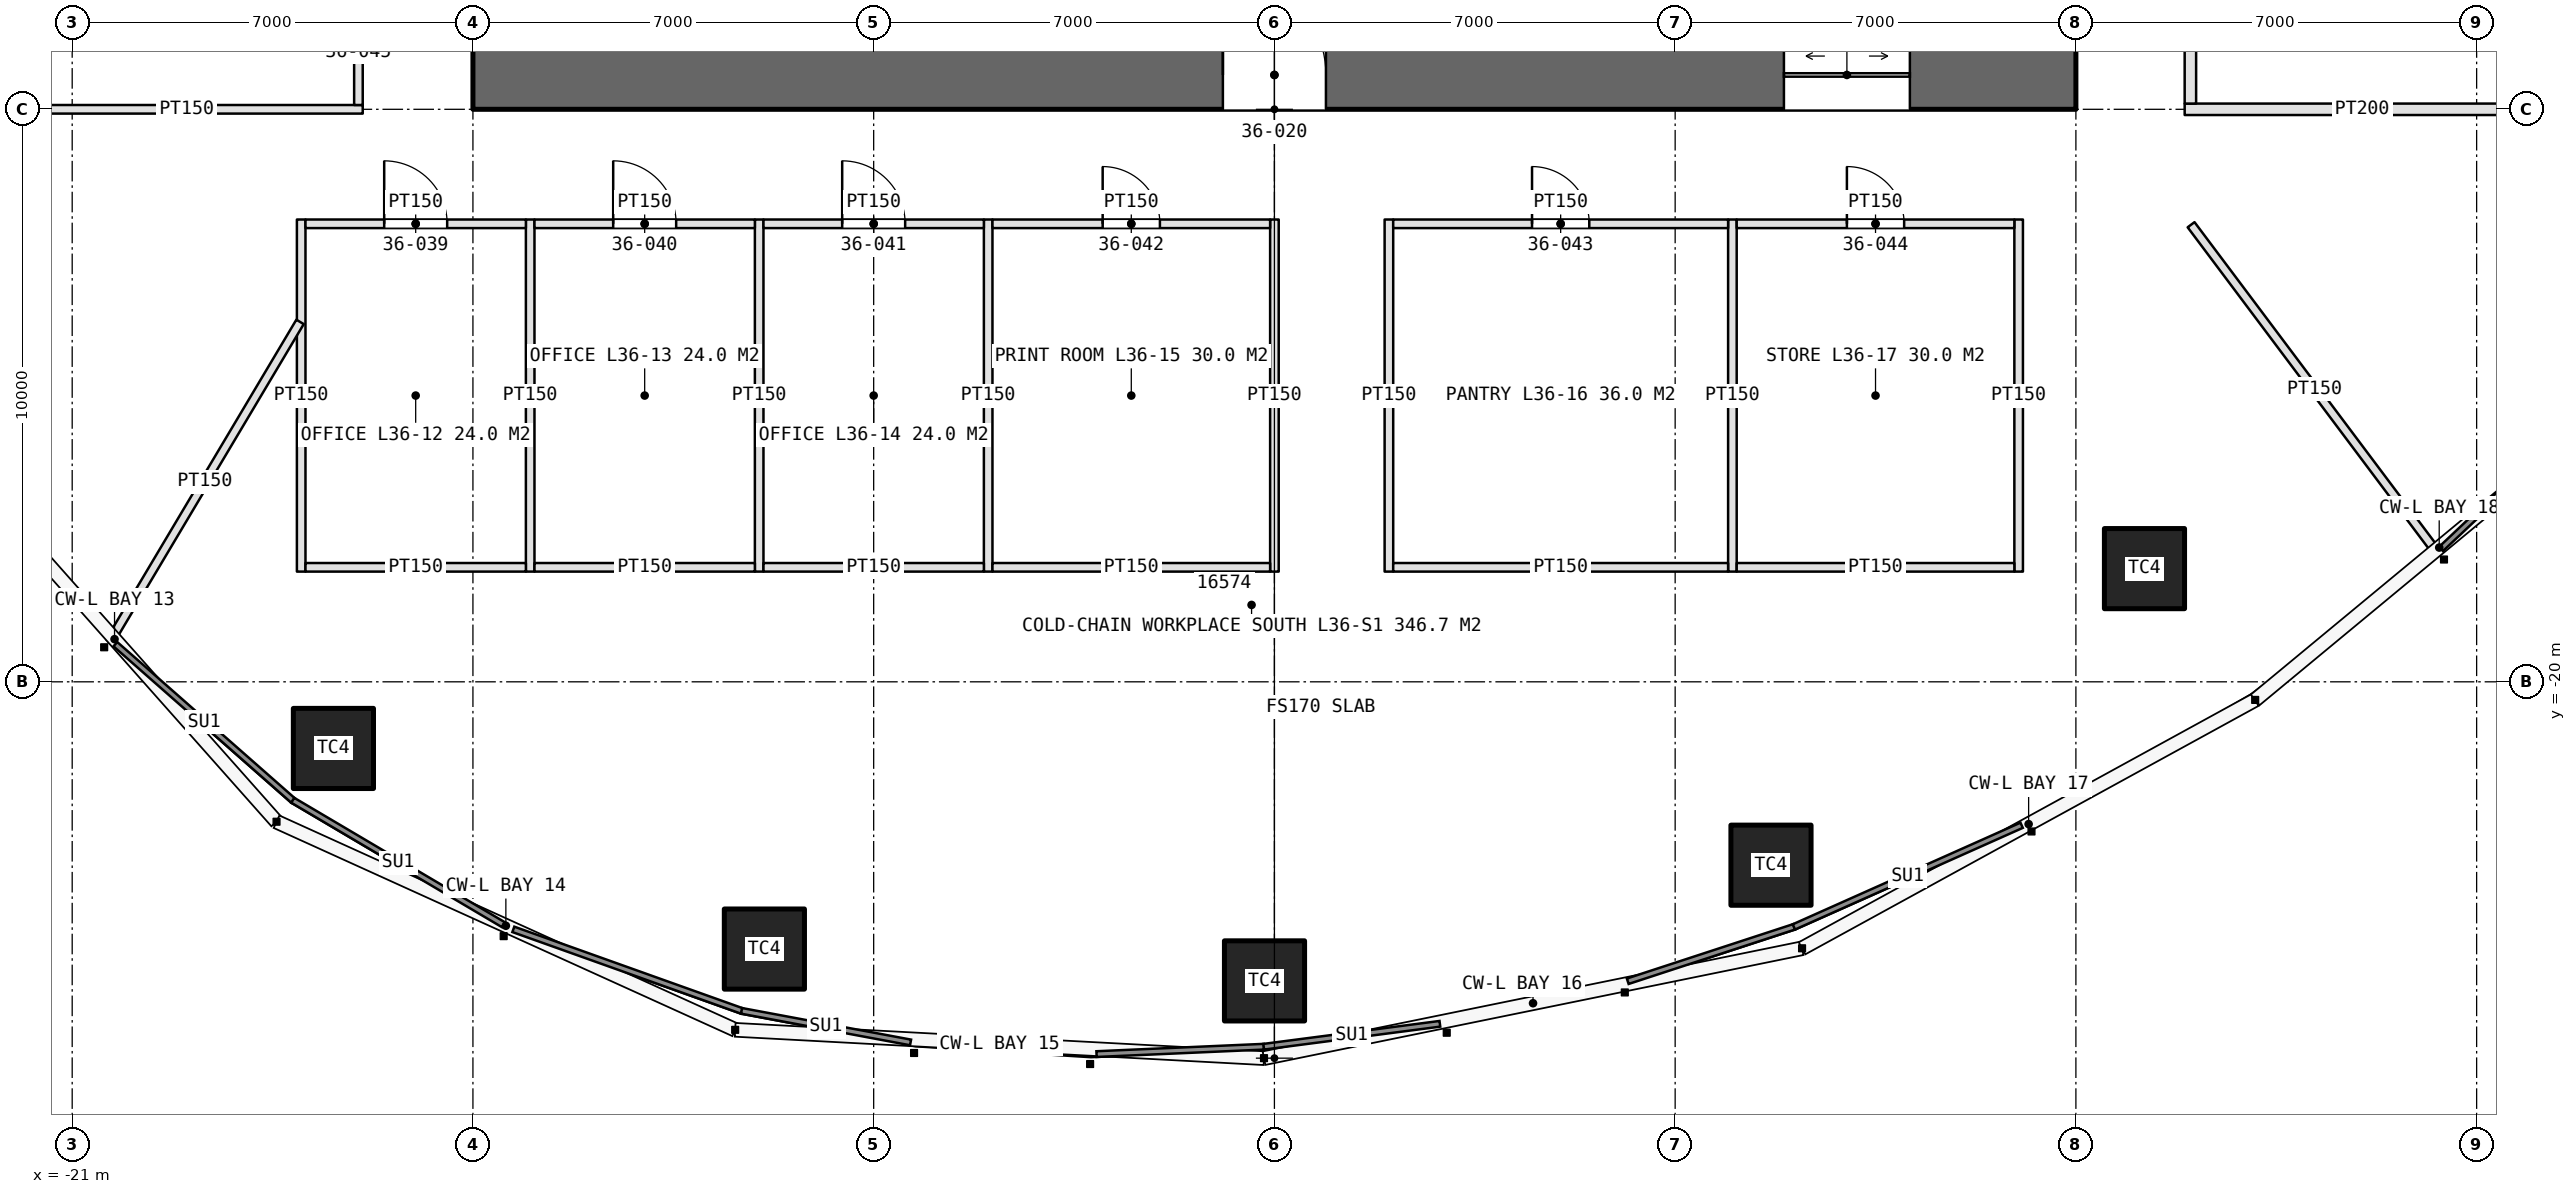
"""IFC4 building model, lengths in metres.
Left out: names, types, materials, properties, quantities, classifications, styles, units other than length and angle.
Written with IfcOpenShell. Run it as: python <this file> out.ifc"""

import sys

from ifc_helpers import new_model, si_unit, direction, frame, frame_2d, origin, origin_2d, place, context, subcontext, project, spatial, rectangle, extrude, element, fill, save


model = new_model("IFC4")
c1 = context("Model", 3, precision=1e-05, world=origin(), true_north=direction((0.0, 1.0)))
c2 = subcontext(c1, "Body", "Model", "MODEL_VIEW")
j1 = project(units=[si_unit("LENGTHUNIT", "METRE"), si_unit("PLANEANGLEUNIT", "RADIAN")], contexts=[c1])
p1 = place(None, origin())
s1 = spatial("IfcSite", under=j1, at=p1, CompositionType="ELEMENT")
p2 = place(p1, origin())
s2 = spatial("IfcBuilding", under=s1, at=p2, CompositionType="ELEMENT")
p3 = place(p2, frame((0.0, 0.0, 168.0)))
s3 = spatial("IfcBuildingStorey", under=s2, at=p3, CompositionType="ELEMENT", Elevation=168.0)
p4 = place(p3, frame((-14.0, -9.4, 0.0), z_axis=(0.0, 0.0, 1.0), x_axis=(1.0, 0.0, 0.0)))
e1 = element("IfcWall", 1, at=p4, inside=s3, PredefinedType="SHEAR", context=c2, shape_type="SweptSolid", body=[
    extrude(rectangle(XDim=28.0, YDim=1.2, at=frame_2d((14.0, 0.0))), origin(), (0.0, 0.0, 1.0), 4.2),
])
p5 = place(p4, frame((13.1, 0.0, 0.0)))
e2 = element("IfcOpeningElement", 2, at=p5, cuts=e1, PredefinedType="OPENING", context=c2, shape_type="SweptSolid", body=[
    extrude(rectangle(XDim=1.8, YDim=2.4, at=frame_2d((0.9, 1.2))), frame((0.0, 0.61, 0.0), z_axis=(0.0, -1.0, 0.0), x_axis=(1.0, 0.0, 0.0)), (0.0, 0.0, 1.0), 1.22),
])
p6 = place(p4, frame((22.9, 0.0, 0.0)))
e3 = element("IfcOpeningElement", 3, at=p6, cuts=e1, PredefinedType="OPENING", context=c2, shape_type="SweptSolid", body=[
    extrude(rectangle(XDim=2.2, YDim=2.7, at=frame_2d((1.1, 1.35))), frame((0.0, 0.61, 0.0), z_axis=(0.0, -1.0, 0.0), x_axis=(1.0, 0.0, 0.0)), (0.0, 0.0, 1.0), 1.22),
])
for number, where, z_axis, x_axis in (
    (4, (-16.437, -21.164, 0.0), (0.0, 0.0, 1.0), (1.0, 0.0, 0.0)),
    (5, (-8.909, -24.668, 0.0), (0.0, 0.0, 1.0), (1.0, 0.0, 0.0)),
    (6, (-0.173, -25.224, 0.0), (0.0, 0.0, 1.0), (1.0, 0.0, 0.0)),
    (7, (8.674, -23.203, 0.0), (0.0, 0.0, 1.0), (1.0, 0.0, 0.0)),
    (8, (15.198, -18.023, 0.0), (0.0, 0.0, 1.0), (1.0, 0.0, 0.0)),
):
    element("IfcColumn", number, at=place(p3, frame(where, z_axis=z_axis, x_axis=x_axis)), inside=s3, PredefinedType="COLUMN", context=c2, shape_type="SweptSolid", body=[
        extrude(rectangle(XDim=1.4, YDim=1.4, at=origin_2d()), origin(), (0.0, 0.0, 1.0), 4.2),
    ])
p7 = place(p3, frame((15.9, -10.0, 0.0), z_axis=(0.0, 0.0, 1.0), x_axis=(1.0, 0.0, 0.0)))
e9 = element("IfcWall", 9, at=p7, inside=s3, PredefinedType="PARTITIONING", context=c2, shape_type="SweptSolid", body=[
    extrude(rectangle(XDim=6.2, YDim=0.2, at=frame_2d((3.1, 0.0))), origin(), (0.0, 0.0, 1.0), 3.0),
])
p8 = place(p3, frame((16.0, -9.9, 0.0), z_axis=(0.0, 0.0, 1.0), x_axis=(0.0, 1.0, 0.0)))
e10 = element("IfcWall", 10, at=p8, inside=s3, PredefinedType="PARTITIONING", context=c2, shape_type="SweptSolid", body=[
    extrude(rectangle(XDim=6.8, YDim=0.2, at=frame_2d((3.4, 0.0))), origin(), (0.0, 0.0, 1.0), 3.0),
])
p9 = place(p8, frame((2.8, 0.0, 0.0)))
e11 = element("IfcOpeningElement", 11, at=p9, cuts=e10, PredefinedType="OPENING", context=c2, shape_type="SweptSolid", body=[
    extrude(rectangle(XDim=1.2, YDim=2.4, at=frame_2d((0.6, 1.2))), frame((0.0, 0.11, 0.0), z_axis=(0.0, -1.0, 0.0), x_axis=(1.0, 0.0, 0.0)), (0.0, 0.0, 1.0), 0.22),
])
for number, where, z_axis, x_axis in (
    (12, (-17.0, -11.925, 0.0), (0.0, 0.0, 1.0), (0.0, -1.0, 0.0)),
    (13, (-13.0, -11.925, 0.0), (0.0, 0.0, 1.0), (0.0, -1.0, 0.0)),
    (14, (-9.0, -11.925, 0.0), (0.0, 0.0, 1.0), (0.0, -1.0, 0.0)),
    (15, (-5.0, -11.925, 0.0), (0.0, 0.0, 1.0), (0.0, -1.0, 0.0)),
    (16, (0.0, -11.925, 0.0), (0.0, 0.0, 1.0), (0.0, -1.0, 0.0)),
):
    element("IfcWall", number, at=place(p3, frame(where, z_axis=z_axis, x_axis=x_axis)), inside=s3, PredefinedType="PARTITIONING", context=c2, shape_type="SweptSolid", body=[
        extrude(rectangle(XDim=6.15, YDim=0.15, at=frame_2d((3.075, 0.0))), origin(), (0.0, 0.0, 1.0), 3.0),
    ])
p10 = place(p3, frame((-16.925, -12.0, 0.0), z_axis=(0.0, 0.0, 1.0), x_axis=(1.0, 0.0, 0.0)))
e17 = element("IfcWall", 17, at=p10, inside=s3, PredefinedType="PARTITIONING", context=c2, shape_type="SweptSolid", body=[
    extrude(rectangle(XDim=3.85, YDim=0.15, at=frame_2d((1.925, 0.0))), origin(), (0.0, 0.0, 1.0), 3.0),
])
p11 = place(p10, frame((1.375, 0.0, 0.0)))
e18 = element("IfcOpeningElement", 18, at=p11, cuts=e17, PredefinedType="OPENING", context=c2, shape_type="SweptSolid", body=[
    extrude(rectangle(XDim=1.1, YDim=2.3, at=frame_2d((0.55, 1.15))), frame((0.0, 0.085, 0.0), z_axis=(0.0, -1.0, 0.0), x_axis=(1.0, 0.0, 0.0)), (0.0, 0.0, 1.0), 0.17),
])
p12 = place(p3, frame((-16.925, -18.0, 0.0), z_axis=(0.0, 0.0, 1.0), x_axis=(1.0, 0.0, 0.0)))
e19 = element("IfcWall", 19, at=p12, inside=s3, PredefinedType="PARTITIONING", context=c2, shape_type="SweptSolid", body=[
    extrude(rectangle(XDim=3.85, YDim=0.15, at=frame_2d((1.925, 0.0))), origin(), (0.0, 0.0, 1.0), 3.0),
])
p13 = place(p3, frame((-12.925, -12.0, 0.0), z_axis=(0.0, 0.0, 1.0), x_axis=(1.0, 0.0, 0.0)))
e20 = element("IfcWall", 20, at=p13, inside=s3, PredefinedType="PARTITIONING", context=c2, shape_type="SweptSolid", body=[
    extrude(rectangle(XDim=3.85, YDim=0.15, at=frame_2d((1.925, 0.0))), origin(), (0.0, 0.0, 1.0), 3.0),
])
p14 = place(p13, frame((1.375, 0.0, 0.0)))
e21 = element("IfcOpeningElement", 21, at=p14, cuts=e20, PredefinedType="OPENING", context=c2, shape_type="SweptSolid", body=[
    extrude(rectangle(XDim=1.1, YDim=2.3, at=frame_2d((0.55, 1.15))), frame((0.0, 0.085, 0.0), z_axis=(0.0, -1.0, 0.0), x_axis=(1.0, 0.0, 0.0)), (0.0, 0.0, 1.0), 0.17),
])
p15 = place(p3, frame((-12.925, -18.0, 0.0), z_axis=(0.0, 0.0, 1.0), x_axis=(1.0, 0.0, 0.0)))
e22 = element("IfcWall", 22, at=p15, inside=s3, PredefinedType="PARTITIONING", context=c2, shape_type="SweptSolid", body=[
    extrude(rectangle(XDim=3.85, YDim=0.15, at=frame_2d((1.925, 0.0))), origin(), (0.0, 0.0, 1.0), 3.0),
])
p16 = place(p3, frame((-8.925, -12.0, 0.0), z_axis=(0.0, 0.0, 1.0), x_axis=(1.0, 0.0, 0.0)))
e23 = element("IfcWall", 23, at=p16, inside=s3, PredefinedType="PARTITIONING", context=c2, shape_type="SweptSolid", body=[
    extrude(rectangle(XDim=3.85, YDim=0.15, at=frame_2d((1.925, 0.0))), origin(), (0.0, 0.0, 1.0), 3.0),
])
p17 = place(p16, frame((1.375, 0.0, 0.0)))
e24 = element("IfcOpeningElement", 24, at=p17, cuts=e23, PredefinedType="OPENING", context=c2, shape_type="SweptSolid", body=[
    extrude(rectangle(XDim=1.1, YDim=2.3, at=frame_2d((0.55, 1.15))), frame((0.0, 0.085, 0.0), z_axis=(0.0, -1.0, 0.0), x_axis=(1.0, 0.0, 0.0)), (0.0, 0.0, 1.0), 0.17),
])
p18 = place(p3, frame((-8.925, -18.0, 0.0), z_axis=(0.0, 0.0, 1.0), x_axis=(1.0, 0.0, 0.0)))
e25 = element("IfcWall", 25, at=p18, inside=s3, PredefinedType="PARTITIONING", context=c2, shape_type="SweptSolid", body=[
    extrude(rectangle(XDim=3.85, YDim=0.15, at=frame_2d((1.925, 0.0))), origin(), (0.0, 0.0, 1.0), 3.0),
])
p19 = place(p3, frame((-4.925, -12.0, 0.0), z_axis=(0.0, 0.0, 1.0), x_axis=(1.0, 0.0, 0.0)))
e26 = element("IfcWall", 26, at=p19, inside=s3, PredefinedType="PARTITIONING", context=c2, shape_type="SweptSolid", body=[
    extrude(rectangle(XDim=4.85, YDim=0.15, at=frame_2d((2.425, 0.0))), origin(), (0.0, 0.0, 1.0), 3.0),
])
p20 = place(p19, frame((1.925, 0.0, 0.0)))
e27 = element("IfcOpeningElement", 27, at=p20, cuts=e26, PredefinedType="OPENING", context=c2, shape_type="SweptSolid", body=[
    extrude(rectangle(XDim=1.0, YDim=2.2, at=frame_2d((0.5, 1.1))), frame((0.0, 0.085, 0.0), z_axis=(0.0, -1.0, 0.0), x_axis=(1.0, 0.0, 0.0)), (0.0, 0.0, 1.0), 0.17),
])
p21 = place(p3, frame((-4.925, -18.0, 0.0), z_axis=(0.0, 0.0, 1.0), x_axis=(1.0, 0.0, 0.0)))
e28 = element("IfcWall", 28, at=p21, inside=s3, PredefinedType="PARTITIONING", context=c2, shape_type="SweptSolid", body=[
    extrude(rectangle(XDim=4.85, YDim=0.15, at=frame_2d((2.425, 0.0))), origin(), (0.0, 0.0, 1.0), 3.0),
])
for number, where, z_axis, x_axis in (
    (29, (2.0, -11.925, 0.0), (0.0, 0.0, 1.0), (0.0, -1.0, 0.0)),
    (30, (8.0, -11.925, 0.0), (0.0, 0.0, 1.0), (0.0, -1.0, 0.0)),
    (31, (13.0, -11.925, 0.0), (0.0, 0.0, 1.0), (0.0, -1.0, 0.0)),
):
    element("IfcWall", number, at=place(p3, frame(where, z_axis=z_axis, x_axis=x_axis)), inside=s3, PredefinedType="PARTITIONING", context=c2, shape_type="SweptSolid", body=[
        extrude(rectangle(XDim=6.15, YDim=0.15, at=frame_2d((3.075, 0.0))), origin(), (0.0, 0.0, 1.0), 3.0),
    ])
p22 = place(p3, frame((2.075, -12.0, 0.0), z_axis=(0.0, 0.0, 1.0), x_axis=(1.0, 0.0, 0.0)))
e32 = element("IfcWall", 32, at=p22, inside=s3, PredefinedType="PARTITIONING", context=c2, shape_type="SweptSolid", body=[
    extrude(rectangle(XDim=5.85, YDim=0.15, at=frame_2d((2.925, 0.0))), origin(), (0.0, 0.0, 1.0), 3.0),
])
p23 = place(p22, frame((2.425, 0.0, 0.0)))
e33 = element("IfcOpeningElement", 33, at=p23, cuts=e32, PredefinedType="OPENING", context=c2, shape_type="SweptSolid", body=[
    extrude(rectangle(XDim=1.0, YDim=2.2, at=frame_2d((0.5, 1.1))), frame((0.0, 0.085, 0.0), z_axis=(0.0, -1.0, 0.0), x_axis=(1.0, 0.0, 0.0)), (0.0, 0.0, 1.0), 0.17),
])
p24 = place(p3, frame((2.075, -18.0, 0.0), z_axis=(0.0, 0.0, 1.0), x_axis=(1.0, 0.0, 0.0)))
e34 = element("IfcWall", 34, at=p24, inside=s3, PredefinedType="PARTITIONING", context=c2, shape_type="SweptSolid", body=[
    extrude(rectangle(XDim=5.85, YDim=0.15, at=frame_2d((2.925, 0.0))), origin(), (0.0, 0.0, 1.0), 3.0),
])
p25 = place(p3, frame((8.075, -12.0, 0.0), z_axis=(0.0, 0.0, 1.0), x_axis=(1.0, 0.0, 0.0)))
e35 = element("IfcWall", 35, at=p25, inside=s3, PredefinedType="PARTITIONING", context=c2, shape_type="SweptSolid", body=[
    extrude(rectangle(XDim=4.85, YDim=0.15, at=frame_2d((2.425, 0.0))), origin(), (0.0, 0.0, 1.0), 3.0),
])
p26 = place(p25, frame((1.925, 0.0, 0.0)))
e36 = element("IfcOpeningElement", 36, at=p26, cuts=e35, PredefinedType="OPENING", context=c2, shape_type="SweptSolid", body=[
    extrude(rectangle(XDim=1.0, YDim=2.2, at=frame_2d((0.5, 1.1))), frame((0.0, 0.085, 0.0), z_axis=(0.0, -1.0, 0.0), x_axis=(1.0, 0.0, 0.0)), (0.0, 0.0, 1.0), 0.17),
])
p27 = place(p3, frame((8.075, -18.0, 0.0), z_axis=(0.0, 0.0, 1.0), x_axis=(1.0, 0.0, 0.0)))
e37 = element("IfcWall", 37, at=p27, inside=s3, PredefinedType="PARTITIONING", context=c2, shape_type="SweptSolid", body=[
    extrude(rectangle(XDim=4.85, YDim=0.15, at=frame_2d((2.425, 0.0))), origin(), (0.0, 0.0, 1.0), 3.0),
])
p28 = place(p3, frame((-15.925, -10.0, 0.0), z_axis=(0.0, 0.0, 1.0), x_axis=(-1.0, 0.0, 0.0)))
e38 = element("IfcWall", 38, at=p28, inside=s3, PredefinedType="PARTITIONING", context=c2, shape_type="SweptSolid", body=[
    extrude(rectangle(XDim=6.15, YDim=0.15, at=frame_2d((3.075, 0.0))), origin(), (0.0, 0.0, 1.0), 3.0),
])
p29 = place(p3, frame((-16.0, -9.925, 0.0), z_axis=(0.0, 0.0, 1.0), x_axis=(0.0, 1.0, 0.0)))
e39 = element("IfcWall", 39, at=p29, inside=s3, PredefinedType="PARTITIONING", context=c2, shape_type="SweptSolid", body=[
    extrude(rectangle(XDim=3.85, YDim=0.15, at=frame_2d((1.925, 0.0))), origin(), (0.0, 0.0, 1.0), 3.0),
])
p30 = place(p29, frame((1.375, 0.0, 0.0)))
e40 = element("IfcOpeningElement", 40, at=p30, cuts=e39, PredefinedType="OPENING", context=c2, shape_type="SweptSolid", body=[
    extrude(rectangle(XDim=1.1, YDim=2.3, at=frame_2d((0.55, 1.15))), frame((0.0, 0.085, 0.0), z_axis=(0.0, -1.0, 0.0), x_axis=(1.0, 0.0, 0.0)), (0.0, 0.0, 1.0), 0.17),
])
p31 = place(p3, frame((-17.02, -13.713, 0.0), z_axis=(0.0, 0.0, 1.0), x_axis=(-0.511508304982, -0.859278333216, 0.0)))
e41 = element("IfcWall", 41, at=p31, inside=s3, PredefinedType="PARTITIONING", context=c2, shape_type="SweptSolid", body=[
    extrude(rectangle(XDim=6.497, YDim=0.15, at=frame_2d((3.248, 0.0))), origin(), (0.0, 0.0, 1.0), 3.0),
])
p32 = place(p3, frame((16.012, -12.016, 0.0), z_axis=(0.0, 0.0, 1.0), x_axis=(0.600059749679, -0.799955184254, 0.0)))
e42 = element("IfcWall", 42, at=p32, inside=s3, PredefinedType="PARTITIONING", context=c2, shape_type="SweptSolid", body=[
    extrude(rectangle(XDim=7.191, YDim=0.15, at=frame_2d((3.596, 0.0))), origin(), (0.0, 0.0, 1.0), 3.0),
])
p33 = place(p5, origin())
e43 = element("IfcDoor", 43, at=p33, inside=s3, OperationType="DOUBLE_DOOR_SINGLE_SWING", PredefinedType="DOOR", context=c2, shape_type="SweptSolid", body=[
    extrude(rectangle(XDim=1.8, YDim=2.4, at=frame_2d((0.9, 1.2))), frame((0.0, 0.025, 0.0), z_axis=(0.0, -1.0, 0.0), x_axis=(1.0, 0.0, 0.0)), (0.0, 0.0, 1.0), 0.05),
])
fill(e2, e43)
p34 = place(p6, origin())
e44 = element("IfcDoor", 44, at=p34, inside=s3, OperationType="DOUBLE_DOOR_SLIDING", PredefinedType="DOOR", context=c2, shape_type="SweptSolid", body=[
    extrude(rectangle(XDim=2.2, YDim=2.7, at=frame_2d((1.1, 1.35))), frame((0.0, 0.025, 0.0), z_axis=(0.0, -1.0, 0.0), x_axis=(1.0, 0.0, 0.0)), (0.0, 0.0, 1.0), 0.05),
])
fill(e3, e44)
p35 = place(p11, origin())
e45 = element("IfcDoor", 45, at=p35, inside=s3, OperationType="SINGLE_SWING_LEFT", PredefinedType="DOOR", context=c2, shape_type="SweptSolid", body=[
    extrude(rectangle(XDim=1.1, YDim=2.3, at=frame_2d((0.55, 1.15))), frame((0.0, 0.025, 0.0), z_axis=(0.0, -1.0, 0.0), x_axis=(1.0, 0.0, 0.0)), (0.0, 0.0, 1.0), 0.05),
])
fill(e18, e45)
p36 = place(p14, origin())
e46 = element("IfcDoor", 46, at=p36, inside=s3, OperationType="SINGLE_SWING_LEFT", PredefinedType="DOOR", context=c2, shape_type="SweptSolid", body=[
    extrude(rectangle(XDim=1.1, YDim=2.3, at=frame_2d((0.55, 1.15))), frame((0.0, 0.025, 0.0), z_axis=(0.0, -1.0, 0.0), x_axis=(1.0, 0.0, 0.0)), (0.0, 0.0, 1.0), 0.05),
])
fill(e21, e46)
p37 = place(p17, origin())
e47 = element("IfcDoor", 47, at=p37, inside=s3, OperationType="SINGLE_SWING_LEFT", PredefinedType="DOOR", context=c2, shape_type="SweptSolid", body=[
    extrude(rectangle(XDim=1.1, YDim=2.3, at=frame_2d((0.55, 1.15))), frame((0.0, 0.025, 0.0), z_axis=(0.0, -1.0, 0.0), x_axis=(1.0, 0.0, 0.0)), (0.0, 0.0, 1.0), 0.05),
])
fill(e24, e47)
p38 = place(p20, origin())
e48 = element("IfcDoor", 48, at=p38, inside=s3, OperationType="SINGLE_SWING_LEFT", PredefinedType="DOOR", context=c2, shape_type="SweptSolid", body=[
    extrude(rectangle(XDim=1.0, YDim=2.2, at=frame_2d((0.5, 1.1))), frame((0.0, 0.025, 0.0), z_axis=(0.0, -1.0, 0.0), x_axis=(1.0, 0.0, 0.0)), (0.0, 0.0, 1.0), 0.05),
])
fill(e27, e48)
p39 = place(p23, origin())
e49 = element("IfcDoor", 49, at=p39, inside=s3, OperationType="SINGLE_SWING_LEFT", PredefinedType="DOOR", context=c2, shape_type="SweptSolid", body=[
    extrude(rectangle(XDim=1.0, YDim=2.2, at=frame_2d((0.5, 1.1))), frame((0.0, 0.025, 0.0), z_axis=(0.0, -1.0, 0.0), x_axis=(1.0, 0.0, 0.0)), (0.0, 0.0, 1.0), 0.05),
])
fill(e33, e49)
p40 = place(p26, origin())
e50 = element("IfcDoor", 50, at=p40, inside=s3, OperationType="SINGLE_SWING_LEFT", PredefinedType="DOOR", context=c2, shape_type="SweptSolid", body=[
    extrude(rectangle(XDim=1.0, YDim=2.2, at=frame_2d((0.5, 1.1))), frame((0.0, 0.025, 0.0), z_axis=(0.0, -1.0, 0.0), x_axis=(1.0, 0.0, 0.0)), (0.0, 0.0, 1.0), 0.05),
])
fill(e36, e50)
save(model, sys.argv[1])
